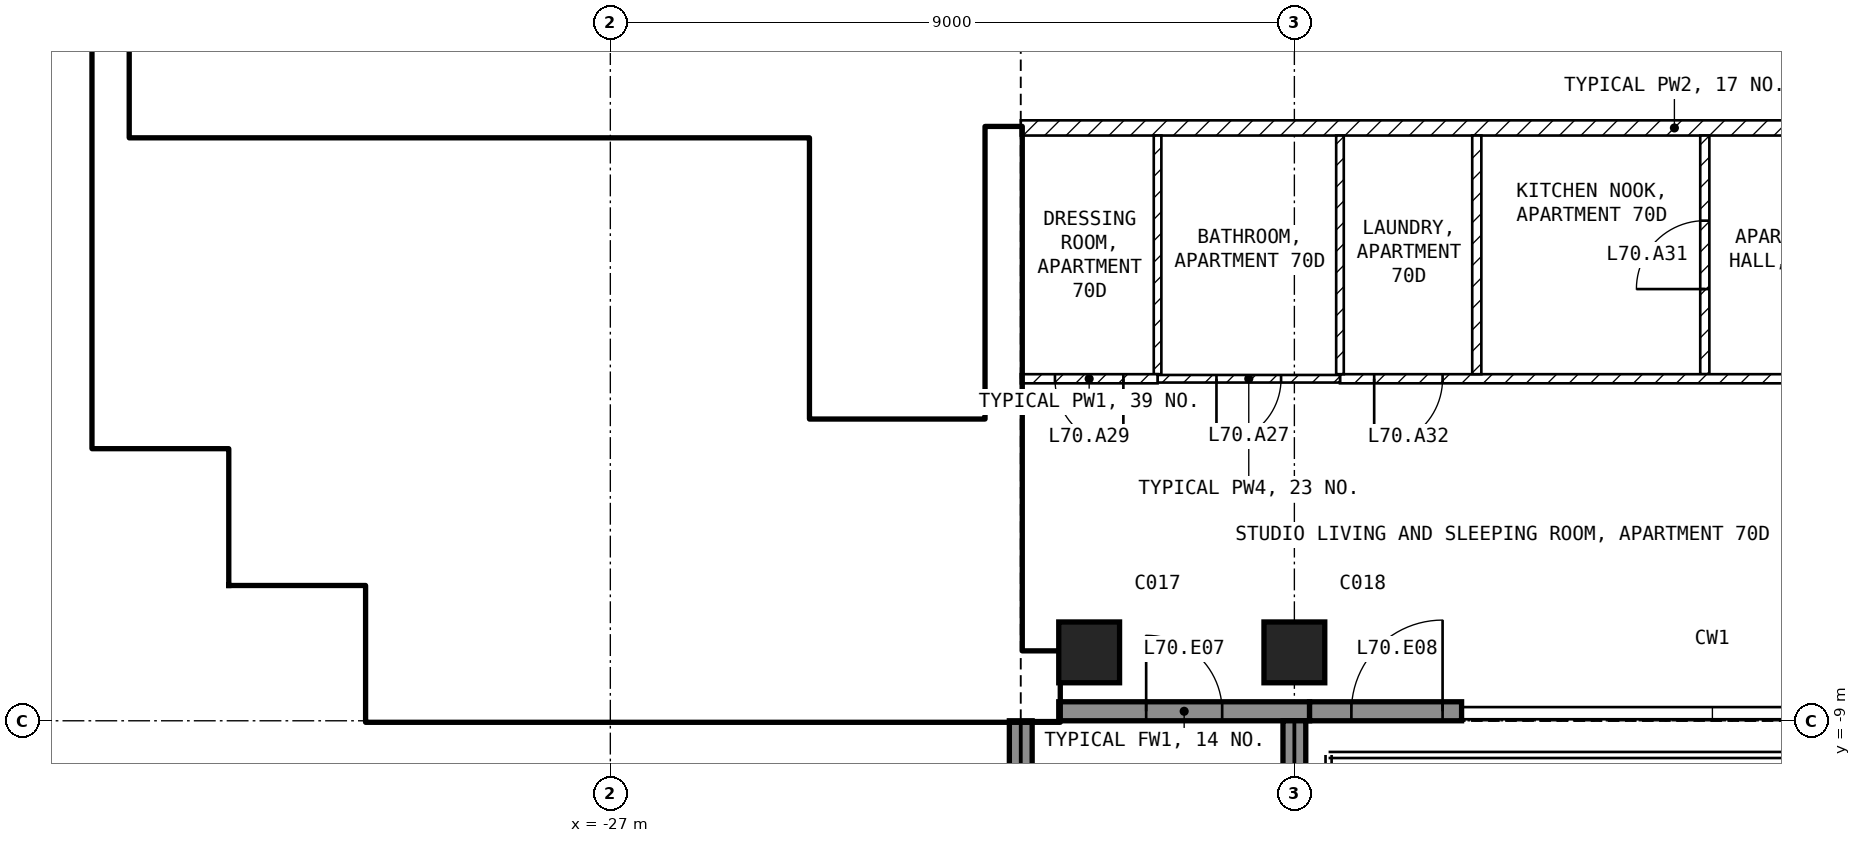
"""IFC4 building model, lengths in metres.
Left out: names, types, materials, properties, quantities, classifications, styles, units other than length and angle.
Written with IfcOpenShell. Run it as: python <this file> out.ifc"""

import sys

from ifc_helpers import new_model, si_unit, direction, frame, frame_2d, origin, origin_2d, place, context, subcontext, project, spatial, rectangle, extrude, element, fill, save


model = new_model("IFC4")
c1 = context("Model", 3, precision=1e-05, world=origin(), true_north=direction((0.0, 1.0)))
c2 = subcontext(c1, "Body", "Model", "MODEL_VIEW")
j1 = project(units=[si_unit("LENGTHUNIT", "METRE"), si_unit("PLANEANGLEUNIT", "RADIAN")], contexts=[c1])
p1 = place(None, origin())
s1 = spatial("IfcSite", under=j1, at=p1, CompositionType="ELEMENT")
p2 = place(p1, origin())
s2 = spatial("IfcBuilding", under=s1, at=p2, CompositionType="ELEMENT")
p3 = place(p2, frame((0.0, 0.0, 274.5)))
s3 = spatial("IfcBuildingStorey", under=s2, at=p3, CompositionType="ELEMENT", Elevation=274.5)
for number, where, z_axis, x_axis in (
    (1, (-20.7, -8.1, -0.25), (0.0, 0.0, 1.0), (1.0, 0.0, 0.0)),
    (2, (-18.0, -8.1, -0.25), (0.0, 0.0, 1.0), (1.0, 0.0, 0.0)),
):
    element("IfcColumn", number, at=place(p3, frame(where, z_axis=z_axis, x_axis=x_axis)), inside=s3, PredefinedType="COLUMN", context=c2, shape_type="SweptSolid", body=[
        extrude(rectangle(XDim=0.8, YDim=0.8, at=origin_2d()), origin(), (0.0, 0.0, 1.0), 3.5),
    ])
p4 = place(p3, frame((-21.1, -8.875, 0.0), z_axis=(0.0, 0.0, 1.0), x_axis=(1.0, 0.0, 0.0)))
e3 = element("IfcWall", 3, at=p4, inside=s3, PredefinedType="SOLIDWALL", context=c2, shape_type="SweptSolid", body=[
    extrude(rectangle(XDim=3.3, YDim=0.25, at=frame_2d((1.65, 0.0))), origin(), (0.0, 0.0, 1.0), 3.25),
])
p5 = place(p4, frame((1.15, 0.0, 0.0)))
e4 = element("IfcOpeningElement", 4, at=p5, cuts=e3, PredefinedType="OPENING", context=c2, shape_type="SweptSolid", body=[
    extrude(rectangle(XDim=1.0, YDim=2.4, at=frame_2d((0.5, 1.2))), frame((0.0, 0.135, 0.0), z_axis=(0.0, -1.0, 0.0), x_axis=(1.0, 0.0, 0.0)), (0.0, 0.0, 1.0), 0.27),
])
p6 = place(p3, frame((-17.8, -8.875, 0.0), z_axis=(0.0, 0.0, 1.0), x_axis=(1.0, 0.0, 0.0)))
e5 = element("IfcWall", 5, at=p6, inside=s3, PredefinedType="SOLIDWALL", context=c2, shape_type="SweptSolid", body=[
    extrude(rectangle(XDim=2.0, YDim=0.25, at=frame_2d((1.0, 0.0))), origin(), (0.0, 0.0, 1.0), 3.25),
])
p7 = place(p6, frame((0.55, 0.0, 0.0)))
e6 = element("IfcOpeningElement", 6, at=p7, cuts=e5, PredefinedType="OPENING", context=c2, shape_type="SweptSolid", body=[
    extrude(rectangle(XDim=1.2, YDim=2.4, at=frame_2d((0.6, 1.2))), frame((0.0, 0.135, 0.0), z_axis=(0.0, -1.0, 0.0), x_axis=(1.0, 0.0, 0.0)), (0.0, 0.0, 1.0), 0.27),
])
p8 = place(p3, frame((-21.6, -9.0, 0.0), z_axis=(0.0, 0.0, 1.0), x_axis=(0.0, -1.0, 0.0)))
e7 = element("IfcWall", 7, at=p8, inside=s3, PredefinedType="SOLIDWALL", context=c2, shape_type="SweptSolid", body=[
    extrude(rectangle(XDim=2.7, YDim=0.3, at=frame_2d((1.35, 0.0))), origin(), (0.0, 0.0, 1.0), 3.25),
])
p9 = place(p3, frame((-18.0, -9.0, 0.0), z_axis=(0.0, 0.0, 1.0), x_axis=(0.0, -1.0, 0.0)))
e8 = element("IfcWall", 8, at=p9, inside=s3, PredefinedType="SOLIDWALL", context=c2, shape_type="SweptSolid", body=[
    extrude(rectangle(XDim=2.74, YDim=0.3, at=frame_2d((1.37, 0.0))), origin(), (0.0, 0.0, 1.0), 3.25),
])
p10 = place(p3, frame((-30.2, -8.55, 0.0), z_axis=(0.0, 0.0, 1.0), x_axis=(1.0, 0.0, 0.0)))
e9 = element("IfcWall", 9, at=p10, inside=s3, PredefinedType="SHEAR", context=c2, shape_type="SweptSolid", body=[
    extrude(rectangle(XDim=9.1, YDim=0.9, at=frame_2d((4.55, 0.0))), origin(), (0.0, 0.0, 1.0), 3.25),
])
p11 = place(p3, frame((-29.975, -8.1, 0.0), z_axis=(0.0, 0.0, 1.0), x_axis=(0.0, 1.0, 0.0)))
e10 = element("IfcWall", 10, at=p11, inside=s3, PredefinedType="SHEAR", context=c2, shape_type="SweptSolid", body=[
    extrude(rectangle(XDim=1.35, YDim=0.45, at=frame_2d((0.675, 0.0))), origin(), (0.0, 0.0, 1.0), 3.25),
])
for number, where, z_axis, x_axis in (
    (11, (-32.0, -6.975, 0.0), (0.0, 0.0, 1.0), (1.0, 0.0, 0.0)),
    (12, (-31.775, -6.75, 0.0), (0.0, 0.0, 1.0), (0.0, 1.0, 0.0)),
    (13, (-33.8, -5.175, 0.0), (0.0, 0.0, 1.0), (1.0, 0.0, 0.0)),
):
    element("IfcWall", number, at=place(p3, frame(where, z_axis=z_axis, x_axis=x_axis)), inside=s3, PredefinedType="SHEAR", context=c2, shape_type="SweptSolid", body=[
        extrude(rectangle(XDim=1.8, YDim=0.45, at=frame_2d((0.9, 0.0))), origin(), (0.0, 0.0, 1.0), 3.25),
    ])
p12 = place(p3, frame((-33.575, -4.95, 0.0), z_axis=(0.0, 0.0, 1.0), x_axis=(0.0, 1.0, 0.0)))
e14 = element("IfcWall", 14, at=p12, inside=s3, PredefinedType="SHEAR", context=c2, shape_type="SweptSolid", body=[
    extrude(rectangle(XDim=10.35, YDim=0.45, at=frame_2d((5.175, 0.0))), origin(), (0.0, 0.0, 1.0), 3.25),
])
p13 = place(p3, frame((-21.825, -8.1, 0.0), z_axis=(0.0, 0.0, 1.0), x_axis=(0.0, 1.0, 0.0)))
e15 = element("IfcWall", 15, at=p13, inside=s3, PredefinedType="SHEAR", context=c2, shape_type="SweptSolid", body=[
    extrude(rectangle(XDim=6.9, YDim=0.45, at=frame_2d((3.45, 0.0))), origin(), (0.0, 0.0, 1.0), 3.25),
])
p14 = place(p3, frame((-24.5, -5.05, 0.0), z_axis=(0.0, 0.0, 1.0), x_axis=(0.0, 1.0, 0.0)))
e16 = element("IfcWall", 16, at=p14, inside=s3, PredefinedType="SOLIDWALL", context=c2, shape_type="SweptSolid", body=[
    extrude(rectangle(XDim=3.7, YDim=0.2, at=frame_2d((1.85, 0.0))), origin(), (0.0, 0.0, 1.0), 3.25),
])
p15 = place(p14, frame((0.1, 0.0, 0.0)))
e17 = element("IfcOpeningElement", 17, at=p15, cuts=e16, PredefinedType="OPENING", context=c2, shape_type="SweptSolid", body=[
    extrude(rectangle(XDim=0.8, YDim=2.1, at=frame_2d((0.4, 1.05))), frame((0.0, 0.11, 0.0), z_axis=(0.0, -1.0, 0.0), x_axis=(1.0, 0.0, 0.0)), (0.0, 0.0, 1.0), 0.22),
])
p16 = place(p3, frame((-28.35, -5.15, 0.0), z_axis=(0.0, 0.0, 1.0), x_axis=(1.0, 0.0, 0.0)))
e18 = element("IfcWall", 18, at=p16, inside=s3, PredefinedType="SOLIDWALL", context=c2, shape_type="SweptSolid", body=[
    extrude(rectangle(XDim=6.3, YDim=0.2, at=frame_2d((3.15, 0.0))), origin(), (0.0, 0.0, 1.0), 3.25),
])
p17 = place(p16, frame((5.1, 0.0, 0.0)))
e19 = element("IfcOpeningElement", 19, at=p17, cuts=e18, PredefinedType="OPENING", context=c2, shape_type="SweptSolid", body=[
    extrude(rectangle(XDim=1.0, YDim=2.1, at=frame_2d((0.5, 1.05))), frame((0.0, 0.11, 0.0), z_axis=(0.0, -1.0, 0.0), x_axis=(1.0, 0.0, 0.0)), (0.0, 0.0, 1.0), 0.22),
])
p18 = place(p3, frame((-28.25, -8.1, 0.0), z_axis=(0.0, 0.0, 1.0), x_axis=(0.0, 1.0, 0.0)))
e20 = element("IfcWall", 20, at=p18, inside=s3, PredefinedType="SOLIDWALL", context=c2, shape_type="SweptSolid", body=[
    extrude(rectangle(XDim=2.85, YDim=0.2, at=frame_2d((1.425, 0.0))), origin(), (0.0, 0.0, 1.0), 3.25),
])
p19 = place(p3, frame((-33.35, -1.45, 0.0), z_axis=(0.0, 0.0, 1.0), x_axis=(1.0, 0.0, 0.0)))
e21 = element("IfcWall", 21, at=p19, inside=s3, PredefinedType="SOLIDWALL", context=c2, shape_type="SweptSolid", body=[
    extrude(rectangle(XDim=8.75, YDim=0.2, at=frame_2d((4.375, 0.0))), origin(), (0.0, 0.0, 1.0), 3.25),
])
p20 = place(p19, frame((7.35, 0.0, 0.0)))
e22 = element("IfcOpeningElement", 22, at=p20, cuts=e21, PredefinedType="OPENING", context=c2, shape_type="SweptSolid", body=[
    extrude(rectangle(XDim=1.0, YDim=2.1, at=frame_2d((0.5, 1.05))), frame((0.0, 0.11, 0.0), z_axis=(0.0, -1.0, 0.0), x_axis=(1.0, 0.0, 0.0)), (0.0, 0.0, 1.0), 0.22),
])
p21 = place(p19, frame((5.35, 0.0, 0.0)))
e23 = element("IfcOpeningElement", 23, at=p21, cuts=e21, PredefinedType="OPENING", context=c2, shape_type="SweptSolid", body=[
    extrude(rectangle(XDim=1.0, YDim=2.1, at=frame_2d((0.5, 1.05))), frame((0.0, 0.11, 0.0), z_axis=(0.0, -1.0, 0.0), x_axis=(1.0, 0.0, 0.0)), (0.0, 0.0, 1.0), 0.22),
])
p22 = place(p19, frame((3.35, 0.0, 0.0)))
e24 = element("IfcOpeningElement", 24, at=p22, cuts=e21, PredefinedType="OPENING", context=c2, shape_type="SweptSolid", body=[
    extrude(rectangle(XDim=1.0, YDim=2.1, at=frame_2d((0.5, 1.05))), frame((0.0, 0.11, 0.0), z_axis=(0.0, -1.0, 0.0), x_axis=(1.0, 0.0, 0.0)), (0.0, 0.0, 1.0), 0.22),
])
p23 = place(p19, frame((0.925, 0.0, 0.0)))
e25 = element("IfcOpeningElement", 25, at=p23, cuts=e21, PredefinedType="OPENING", context=c2, shape_type="SweptSolid", body=[
    extrude(rectangle(XDim=0.9, YDim=2.1, at=frame_2d((0.45, 1.05))), frame((0.0, 0.11, 0.0), z_axis=(0.0, -1.0, 0.0), x_axis=(1.0, 0.0, 0.0)), (0.0, 0.0, 1.0), 0.22),
])
p24 = place(p3, frame((-33.35, -3.95, 0.0), z_axis=(0.0, 0.0, 1.0), x_axis=(1.0, 0.0, 0.0)))
e26 = element("IfcWall", 26, at=p24, inside=s3, PredefinedType="SOLIDWALL", context=c2, shape_type="SweptSolid", body=[
    extrude(rectangle(XDim=8.75, YDim=0.2, at=frame_2d((4.375, 0.0))), origin(), (0.0, 0.0, 1.0), 3.25),
])
for number, where, z_axis, x_axis in (
    (27, (-26.5, -3.85, 0.0), (0.0, 0.0, 1.0), (0.0, 1.0, 0.0)),
    (28, (-28.5, -3.85, 0.0), (0.0, 0.0, 1.0), (0.0, 1.0, 0.0)),
    (29, (-30.5, -3.85, 0.0), (0.0, 0.0, 1.0), (0.0, 1.0, 0.0)),
):
    element("IfcWall", number, at=place(p3, frame(where, z_axis=z_axis, x_axis=x_axis)), inside=s3, PredefinedType="SOLIDWALL", context=c2, shape_type="SweptSolid", body=[
        extrude(rectangle(XDim=2.3, YDim=0.2, at=frame_2d((1.15, 0.0))), origin(), (0.0, 0.0, 1.0), 3.25),
    ])
p25 = place(p3, frame((-4.4, -1.2, 0.0), z_axis=(0.0, 0.0, 1.0), x_axis=(-1.0, 0.0, 0.0)))
e30 = element("IfcWall", 30, at=p25, inside=s3, PredefinedType="PARTITIONING", context=c2, shape_type="SweptSolid", body=[
    extrude(rectangle(XDim=17.2, YDim=0.2, at=frame_2d((8.6, 0.0))), origin(), (0.0, 0.0, 1.0), 3.25),
])
p26 = place(p25, frame((5.9, 0.0, 0.0)))
e31 = element("IfcOpeningElement", 31, at=p26, cuts=e30, PredefinedType="OPENING", context=c2, shape_type="SweptSolid", body=[
    extrude(rectangle(XDim=1.0, YDim=2.1, at=frame_2d((0.5, 1.05))), frame((0.0, 0.11, 0.0), z_axis=(0.0, -1.0, 0.0), x_axis=(1.0, 0.0, 0.0)), (0.0, 0.0, 1.0), 0.22),
])
p27 = place(p3, frame((-12.6, -4.44, 0.0), z_axis=(0.0, 0.0, 1.0), x_axis=(0.0, 1.0, 0.0)))
e32 = element("IfcWall", 32, at=p27, inside=s3, PredefinedType="PARTITIONING", context=c2, shape_type="SweptSolid", body=[
    extrude(rectangle(XDim=3.14, YDim=0.12, at=frame_2d((1.57, 0.0))), origin(), (0.0, 0.0, 1.0), 3.25),
])
p28 = place(p27, frame((1.12, 0.0, 0.0)))
e33 = element("IfcOpeningElement", 33, at=p28, cuts=e32, PredefinedType="OPENING", context=c2, shape_type="SweptSolid", body=[
    extrude(rectangle(XDim=0.9, YDim=2.1, at=frame_2d((0.45, 1.05))), frame((0.0, 0.07, 0.0), z_axis=(0.0, -1.0, 0.0), x_axis=(1.0, 0.0, 0.0)), (0.0, 0.0, 1.0), 0.14),
])
p29 = place(p3, frame((-8.94, -4.5, 0.0), z_axis=(0.0, 0.0, 1.0), x_axis=(-1.0, 0.0, 0.0)))
e34 = element("IfcWall", 34, at=p29, inside=s3, PredefinedType="PARTITIONING", context=c2, shape_type="SweptSolid", body=[
    extrude(rectangle(XDim=8.46, YDim=0.12, at=frame_2d((4.23, 0.0))), origin(), (0.0, 0.0, 1.0), 3.25),
])
p30 = place(p29, frame((7.11, 0.0, 0.0)))
e35 = element("IfcOpeningElement", 35, at=p30, cuts=e34, PredefinedType="OPENING", context=c2, shape_type="SweptSolid", body=[
    extrude(rectangle(XDim=0.9, YDim=2.1, at=frame_2d((0.45, 1.05))), frame((0.0, 0.07, 0.0), z_axis=(0.0, -1.0, 0.0), x_axis=(1.0, 0.0, 0.0)), (0.0, 0.0, 1.0), 0.14),
])
p31 = place(p29, frame((1.41, 0.0, 0.0)))
e36 = element("IfcOpeningElement", 36, at=p31, cuts=e34, PredefinedType="OPENING", context=c2, shape_type="SweptSolid", body=[
    extrude(rectangle(XDim=0.9, YDim=2.1, at=frame_2d((0.45, 1.05))), frame((0.0, 0.07, 0.0), z_axis=(0.0, -1.0, 0.0), x_axis=(1.0, 0.0, 0.0)), (0.0, 0.0, 1.0), 0.14),
])
p32 = place(p3, frame((-15.6, -4.44, 0.0), z_axis=(0.0, 0.0, 1.0), x_axis=(0.0, 1.0, 0.0)))
e37 = element("IfcWall", 37, at=p32, inside=s3, PredefinedType="PARTITIONING", context=c2, shape_type="SweptSolid", body=[
    extrude(rectangle(XDim=3.14, YDim=0.12, at=frame_2d((1.57, 0.0))), origin(), (0.0, 0.0, 1.0), 3.25),
])
for number, where, z_axis, x_axis in (
    (38, (-17.4, -4.44, 0.0), (0.0, 0.0, 1.0), (0.0, 1.0, 0.0)),
    (39, (-19.8, -4.44, 0.0), (0.0, 0.0, 1.0), (0.0, 1.0, 0.0)),
):
    element("IfcWall", number, at=place(p3, frame(where, z_axis=z_axis, x_axis=x_axis)), inside=s3, PredefinedType="PARTITIONING", context=c2, shape_type="SweptSolid", body=[
        extrude(rectangle(XDim=3.14, YDim=0.1, at=frame_2d((1.57, 0.0))), origin(), (0.0, 0.0, 1.0), 3.25),
    ])
p33 = place(p3, frame((-17.4, -4.5, 0.0), z_axis=(0.0, 0.0, 1.0), x_axis=(-1.0, 0.0, 0.0)))
e40 = element("IfcWall", 40, at=p33, inside=s3, PredefinedType="PARTITIONING", context=c2, shape_type="SweptSolid", body=[
    extrude(rectangle(XDim=2.4, YDim=0.1, at=frame_2d((1.2, 0.0))), origin(), (0.0, 0.0, 1.0), 3.25),
])
p34 = place(p33, frame((0.775, 0.0, 0.0)))
e41 = element("IfcOpeningElement", 41, at=p34, cuts=e40, PredefinedType="OPENING", context=c2, shape_type="SweptSolid", body=[
    extrude(rectangle(XDim=0.85, YDim=2.1, at=frame_2d((0.425, 1.05))), frame((0.0, 0.06, 0.0), z_axis=(0.0, -1.0, 0.0), x_axis=(1.0, 0.0, 0.0)), (0.0, 0.0, 1.0), 0.12),
])
p35 = place(p3, frame((-19.8, -4.5, 0.0), z_axis=(0.0, 0.0, 1.0), x_axis=(-1.0, 0.0, 0.0)))
e42 = element("IfcWall", 42, at=p35, inside=s3, PredefinedType="PARTITIONING", context=c2, shape_type="SweptSolid", body=[
    extrude(rectangle(XDim=1.8, YDim=0.12, at=frame_2d((0.9, 0.0))), origin(), (0.0, 0.0, 1.0), 3.25),
])
p36 = place(p35, frame((0.45, 0.0, 0.0)))
e43 = element("IfcOpeningElement", 43, at=p36, cuts=e42, PredefinedType="OPENING", context=c2, shape_type="SweptSolid", body=[
    extrude(rectangle(XDim=0.9, YDim=2.1, at=frame_2d((0.45, 1.05))), frame((0.0, 0.07, 0.0), z_axis=(0.0, -1.0, 0.0), x_axis=(1.0, 0.0, 0.0)), (0.0, 0.0, 1.0), 0.14),
])
p37 = place(p5, origin())
e44 = element("IfcDoor", 44, at=p37, inside=s3, OperationType="SINGLE_SWING_LEFT", PredefinedType="DOOR", context=c2, shape_type="SweptSolid", body=[
    extrude(rectangle(XDim=1.0, YDim=2.4, at=frame_2d((0.5, 1.2))), frame((0.0, 0.025, 0.0), z_axis=(0.0, -1.0, 0.0), x_axis=(1.0, 0.0, 0.0)), (0.0, 0.0, 1.0), 0.05),
])
fill(e4, e44)
p38 = place(p7, origin())
e45 = element("IfcDoor", 45, at=p38, inside=s3, OperationType="SINGLE_SWING_RIGHT", PredefinedType="DOOR", context=c2, shape_type="SweptSolid", body=[
    extrude(rectangle(XDim=1.2, YDim=2.4, at=frame_2d((0.6, 1.2))), frame((0.0, 0.025, 0.0), z_axis=(0.0, -1.0, 0.0), x_axis=(1.0, 0.0, 0.0)), (0.0, 0.0, 1.0), 0.05),
])
fill(e6, e45)
p39 = place(p20, origin())
e46 = element("IfcDoor", 46, at=p39, inside=s3, OperationType="DOUBLE_DOOR_SLIDING", PredefinedType="DOOR", context=c2, shape_type="SweptSolid", body=[
    extrude(rectangle(XDim=1.0, YDim=2.1, at=frame_2d((0.5, 1.05))), frame((0.0, 0.025, 0.0), z_axis=(0.0, -1.0, 0.0), x_axis=(1.0, 0.0, 0.0)), (0.0, 0.0, 1.0), 0.05),
])
fill(e22, e46)
p40 = place(p21, origin())
e47 = element("IfcDoor", 47, at=p40, inside=s3, OperationType="DOUBLE_DOOR_SLIDING", PredefinedType="DOOR", context=c2, shape_type="SweptSolid", body=[
    extrude(rectangle(XDim=1.0, YDim=2.1, at=frame_2d((0.5, 1.05))), frame((0.0, 0.025, 0.0), z_axis=(0.0, -1.0, 0.0), x_axis=(1.0, 0.0, 0.0)), (0.0, 0.0, 1.0), 0.05),
])
fill(e23, e47)
p41 = place(p22, origin())
e48 = element("IfcDoor", 48, at=p41, inside=s3, OperationType="DOUBLE_DOOR_SLIDING", PredefinedType="DOOR", context=c2, shape_type="SweptSolid", body=[
    extrude(rectangle(XDim=1.0, YDim=2.1, at=frame_2d((0.5, 1.05))), frame((0.0, 0.025, 0.0), z_axis=(0.0, -1.0, 0.0), x_axis=(1.0, 0.0, 0.0)), (0.0, 0.0, 1.0), 0.05),
])
fill(e24, e48)
p42 = place(p17, origin())
e49 = element("IfcDoor", 49, at=p42, inside=s3, OperationType="SINGLE_SWING_LEFT", PredefinedType="DOOR", context=c2, shape_type="SweptSolid", body=[
    extrude(rectangle(XDim=1.0, YDim=2.1, at=frame_2d((0.5, 1.05))), frame((0.0, 0.025, 0.0), z_axis=(0.0, -1.0, 0.0), x_axis=(1.0, 0.0, 0.0)), (0.0, 0.0, 1.0), 0.05),
])
fill(e19, e49)
p43 = place(p15, origin())
e50 = element("IfcDoor", 50, at=p43, inside=s3, OperationType="SINGLE_SWING_LEFT", PredefinedType="DOOR", context=c2, shape_type="SweptSolid", body=[
    extrude(rectangle(XDim=0.8, YDim=2.1, at=frame_2d((0.4, 1.05))), frame((0.0, 0.025, 0.0), z_axis=(0.0, -1.0, 0.0), x_axis=(1.0, 0.0, 0.0)), (0.0, 0.0, 1.0), 0.05),
])
fill(e17, e50)
p44 = place(p23, origin())
e51 = element("IfcDoor", 51, at=p44, inside=s3, OperationType="SINGLE_SWING_LEFT", PredefinedType="DOOR", context=c2, shape_type="SweptSolid", body=[
    extrude(rectangle(XDim=0.9, YDim=2.1, at=frame_2d((0.45, 1.05))), frame((0.0, 0.025, 0.0), z_axis=(0.0, -1.0, 0.0), x_axis=(1.0, 0.0, 0.0)), (0.0, 0.0, 1.0), 0.05),
])
fill(e25, e51)
p45 = place(p34, origin())
e52 = element("IfcDoor", 52, at=p45, inside=s3, OperationType="SINGLE_SWING_RIGHT", PredefinedType="DOOR", context=c2, shape_type="SweptSolid", body=[
    extrude(rectangle(XDim=0.85, YDim=2.1, at=frame_2d((0.425, 1.05))), frame((0.0, 0.025, 0.0), z_axis=(0.0, -1.0, 0.0), x_axis=(1.0, 0.0, 0.0)), (0.0, 0.0, 1.0), 0.05),
])
fill(e41, e52)
p46 = place(p36, origin())
e53 = element("IfcDoor", 53, at=p46, inside=s3, OperationType="SINGLE_SWING_LEFT", PredefinedType="DOOR", context=c2, shape_type="SweptSolid", body=[
    extrude(rectangle(XDim=0.9, YDim=2.1, at=frame_2d((0.45, 1.05))), frame((0.0, 0.025, 0.0), z_axis=(0.0, -1.0, 0.0), x_axis=(1.0, 0.0, 0.0)), (0.0, 0.0, 1.0), 0.05),
])
fill(e43, e53)
p47 = place(p28, origin())
e54 = element("IfcDoor", 54, at=p47, inside=s3, OperationType="SINGLE_SWING_LEFT", PredefinedType="DOOR", context=c2, shape_type="SweptSolid", body=[
    extrude(rectangle(XDim=0.9, YDim=2.1, at=frame_2d((0.45, 1.05))), frame((0.0, 0.025, 0.0), z_axis=(0.0, -1.0, 0.0), x_axis=(1.0, 0.0, 0.0)), (0.0, 0.0, 1.0), 0.05),
])
fill(e33, e54)
p48 = place(p30, origin())
e55 = element("IfcDoor", 55, at=p48, inside=s3, OperationType="SINGLE_SWING_RIGHT", PredefinedType="DOOR", context=c2, shape_type="SweptSolid", body=[
    extrude(rectangle(XDim=0.9, YDim=2.1, at=frame_2d((0.45, 1.05))), frame((0.0, 0.025, 0.0), z_axis=(0.0, -1.0, 0.0), x_axis=(1.0, 0.0, 0.0)), (0.0, 0.0, 1.0), 0.05),
])
fill(e35, e55)
save(model, sys.argv[1])
